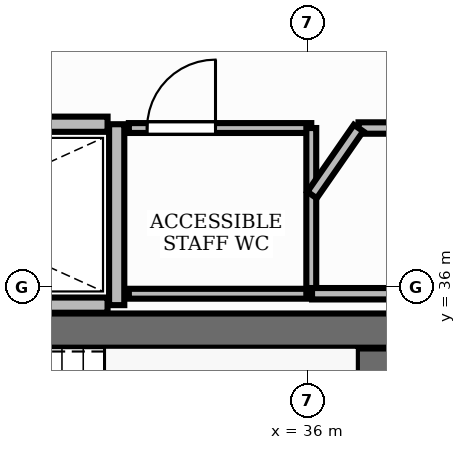
"""IFC4 building model, lengths in metres.
Left out: names, types, materials, properties, quantities, classifications, styles, units other than length and angle.
Written with IfcOpenShell. Run it as: python <this file> out.ifc"""

import sys

from ifc_helpers import new_model, si_unit, direction, frame, frame_2d, origin, place, context, subcontext, project, spatial, rectangle, extrude, element, fill, save


model = new_model("IFC4")
c1 = context("Model", 3, precision=1e-05, world=origin(), true_north=direction((0.0, 1.0)))
c2 = subcontext(c1, "Body", "Model", "MODEL_VIEW")
j1 = project(units=[si_unit("LENGTHUNIT", "METRE"), si_unit("PLANEANGLEUNIT", "RADIAN")], contexts=[c1])
p1 = place(None, origin())
s1 = spatial("IfcSite", under=j1, at=p1, CompositionType="ELEMENT")
p2 = place(p1, origin())
s2 = spatial("IfcBuilding", under=s1, at=p2, CompositionType="ELEMENT")
p3 = place(p2, frame((0.0, 0.0, 38.4)))
s3 = spatial("IfcBuildingStorey", under=s2, at=p3, CompositionType="ELEMENT", Elevation=38.4)
p4 = place(p3, frame((28.852, 35.425, 0.0), z_axis=(0.0, 0.0, 1.0), x_axis=(1.0, 0.0, 0.0)))
e1 = element("IfcWall", 1, at=p4, inside=s3, PredefinedType="SHEAR", context=c2, shape_type="SweptSolid", body=[
    extrude(rectangle(XDim=8.248, YDim=0.45, at=frame_2d((4.124, 0.0))), origin(), (0.0, 0.0, 1.0), 3.9),
])
p5 = place(p3, frame((36.875, 32.11, 0.0), z_axis=(0.0, 0.0, 1.0), x_axis=(0.0, 1.0, 0.0)))
e2 = element("IfcWall", 2, at=p5, inside=s3, PredefinedType="SHEAR", context=c2, shape_type="SweptSolid", body=[
    extrude(rectangle(XDim=3.08, YDim=0.45, at=frame_2d((1.54, 0.0))), origin(), (0.0, 0.0, 1.0), 3.9),
])
p6 = place(p3, frame((33.49, 35.76, 0.0), z_axis=(0.0, 0.0, 1.0), x_axis=(0.0, 1.0, 0.0)))
e3 = element("IfcWall", 3, at=p6, inside=s3, PredefinedType="PARTITIONING", context=c2, shape_type="SweptSolid", body=[
    extrude(rectangle(XDim=2.38, YDim=0.2, at=frame_2d((1.19, 0.0))), origin(), (0.0, 0.0, 1.0), 2.91),
])
for number, where, z_axis, x_axis in (
    (4, (28.8, 35.76, 0.0), (0.0, 0.0, 1.0), (1.0, 0.0, 0.0)),
    (5, (28.8, 38.14, 0.0), (0.0, 0.0, 1.0), (1.0, 0.0, 0.0)),
):
    element("IfcWall", number, at=place(p3, frame(where, z_axis=z_axis, x_axis=x_axis)), inside=s3, PredefinedType="PARTITIONING", context=c2, shape_type="SweptSolid", body=[
        extrude(rectangle(XDim=4.57, YDim=0.2, at=frame_2d((2.285, 0.0))), origin(), (0.0, 0.0, 1.0), 2.91),
    ])
p7 = place(p3, frame((33.65, 38.09, 0.0), z_axis=(0.0, 0.0, 1.0), x_axis=(1.0, 0.0, 0.0)))
e6 = element("IfcWall", 6, at=p7, inside=s3, PredefinedType="PARTITIONING", context=c2, shape_type="SweptSolid", body=[
    extrude(rectangle(XDim=2.4, YDim=0.13, at=frame_2d((1.2, 0.0))), origin(), (0.0, 0.0, 1.0), 2.91),
])
p8 = place(p7, frame((0.24, 0.0, 0.0)))
e7 = element("IfcOpeningElement", 7, at=p8, cuts=e6, PredefinedType="OPENING", context=c2, shape_type="SweptSolid", body=[
    extrude(rectangle(XDim=0.9, YDim=2.15, at=frame_2d((0.45, 1.075))), frame((0.0, 0.08, 0.0), z_axis=(0.0, -1.0, 0.0), x_axis=(1.0, 0.0, 0.0)), (0.0, 0.0, 1.0), 0.16),
])
p9 = place(p3, frame((36.05, 35.91, 0.0), z_axis=(0.0, 0.0, 1.0), x_axis=(-1.0, 0.0, 0.0)))
e8 = element("IfcWall", 8, at=p9, inside=s3, PredefinedType="PARTITIONING", context=c2, shape_type="SweptSolid", body=[
    extrude(rectangle(XDim=2.4, YDim=0.13, at=frame_2d((1.2, 0.0))), origin(), (0.0, 0.0, 1.0), 2.91),
])
p10 = place(p3, frame((36.05, 38.09, 0.0), z_axis=(0.0, 0.0, 1.0), x_axis=(0.0, -1.0, 0.0)))
e9 = element("IfcWall", 9, at=p10, inside=s3, PredefinedType="PARTITIONING", context=c2, shape_type="SweptSolid", body=[
    extrude(rectangle(XDim=2.18, YDim=0.13, at=frame_2d((1.09, 0.0))), origin(), (0.0, 0.0, 1.0), 2.91),
])
p11 = place(p3, frame((36.671, 38.09, 0.0), z_axis=(0.0, 0.0, 1.0), x_axis=(1.0, 0.0, 0.0)))
e10 = element("IfcWall", 10, at=p11, inside=s3, PredefinedType="PARTITIONING", context=c2, shape_type="SweptSolid", body=[
    extrude(rectangle(XDim=0.529, YDim=0.15, at=frame_2d((0.264, 0.0))), origin(), (0.0, 0.0, 1.0), 2.91),
])
p12 = place(p3, frame((37.35, 35.91, 0.0), z_axis=(0.0, 0.0, 1.0), x_axis=(-1.0, 0.0, 0.0)))
e11 = element("IfcWall", 11, at=p12, inside=s3, PredefinedType="PARTITIONING", context=c2, shape_type="SweptSolid", body=[
    extrude(rectangle(XDim=1.29, YDim=0.15, at=frame_2d((0.645, 0.0))), origin(), (0.0, 0.0, 1.0), 2.91),
])
p13 = place(p3, frame((36.06, 37.209, 0.0), z_axis=(0.0, 0.0, 1.0), x_axis=(0.569943577232, 0.821683831393, 0.0)))
e12 = element("IfcWall", 12, at=p13, inside=s3, PredefinedType="PARTITIONING", context=c2, shape_type="SweptSolid", body=[
    extrude(rectangle(XDim=1.073, YDim=0.15, at=frame_2d((0.536, 0.0))), origin(), (0.0, 0.0, 1.0), 2.91),
])
p14 = place(p8, origin())
e13 = element("IfcDoor", 13, at=p14, inside=s3, OperationType="SINGLE_SWING_RIGHT", PredefinedType="DOOR", context=c2, shape_type="SweptSolid", body=[
    extrude(rectangle(XDim=0.9, YDim=2.15, at=frame_2d((0.45, 1.075))), frame((0.0, 0.025, 0.0), z_axis=(0.0, -1.0, 0.0), x_axis=(1.0, 0.0, 0.0)), (0.0, 0.0, 1.0), 0.05),
])
fill(e7, e13)
save(model, sys.argv[1])
